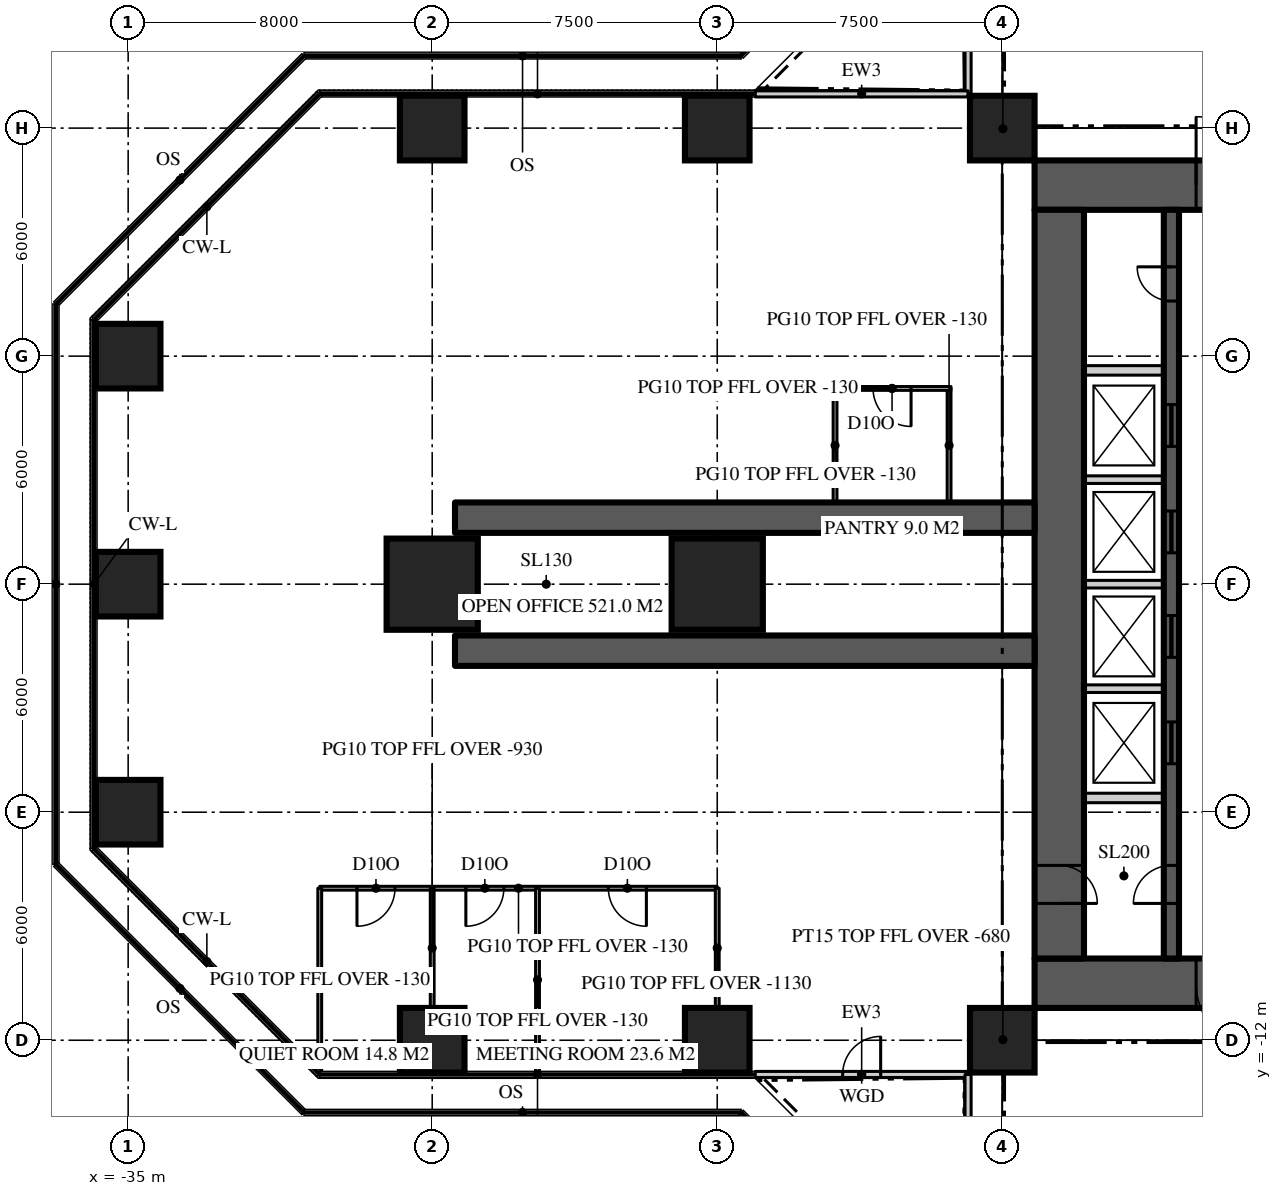
"""IFC4 building model, lengths in metres.
Left out: names, types, materials, properties, quantities, classifications, styles, units other than length and angle.
Written with IfcOpenShell. Run it as: python <this file> out.ifc"""

import sys

from ifc_helpers import new_model, si_unit, direction, frame, frame_2d, origin, origin_2d, place, context, subcontext, project, spatial, rectangle, extrude, element, fill, save


model = new_model("IFC4")
c1 = context("Model", 3, precision=1e-05, world=origin(), true_north=direction((0.0, 1.0)))
c2 = subcontext(c1, "Body", "Model", "MODEL_VIEW")
j1 = project(units=[si_unit("LENGTHUNIT", "METRE"), si_unit("PLANEANGLEUNIT", "RADIAN")], contexts=[c1])
p1 = place(None, origin())
s1 = spatial("IfcSite", under=j1, at=p1, CompositionType="ELEMENT")
p2 = place(p1, origin())
s2 = spatial("IfcBuilding", under=s1, at=p2, CompositionType="ELEMENT")
p3 = place(p2, frame((0.0, 0.0, 66.9)))
s3 = spatial("IfcBuildingStorey", under=s2, at=p3, CompositionType="ELEMENT", Elevation=66.9)
p4 = place(p3, frame((-11.15, 10.5, 0.0), z_axis=(0.0, 0.0, 1.0), x_axis=(1.0, 0.0, 0.0)))
e1 = element("IfcWall", 1, at=p4, inside=s3, PredefinedType="SHEAR", context=c2, shape_type="SweptSolid", body=[
    extrude(rectangle(XDim=22.3, YDim=1.3, at=frame_2d((11.15, 0.0))), origin(), (0.0, 0.0, 1.0), 3.9),
])
p5 = place(p4, frame((4.25, 0.0, 0.0)))
e2 = element("IfcOpeningElement", 2, at=p5, cuts=e1, PredefinedType="OPENING", context=c2, shape_type="SweptSolid", body=[
    extrude(rectangle(XDim=1.8, YDim=2.2, at=frame_2d((0.9, 1.1))), frame((0.0, 0.66, 0.0), z_axis=(0.0, -1.0, 0.0), x_axis=(1.0, 0.0, 0.0)), (0.0, 0.0, 1.0), 1.32),
])
p6 = place(p4, frame((16.25, 0.0, 0.0)))
e3 = element("IfcOpeningElement", 3, at=p6, cuts=e1, PredefinedType="OPENING", context=c2, shape_type="SweptSolid", body=[
    extrude(rectangle(XDim=1.8, YDim=2.2, at=frame_2d((0.9, 1.1))), frame((0.0, 0.66, 0.0), z_axis=(0.0, -1.0, 0.0), x_axis=(1.0, 0.0, 0.0)), (0.0, 0.0, 1.0), 1.32),
])
p7 = place(p3, frame((11.15, -10.5, 0.0), z_axis=(0.0, 0.0, 1.0), x_axis=(-1.0, 0.0, 0.0)))
e4 = element("IfcWall", 4, at=p7, inside=s3, PredefinedType="SHEAR", context=c2, shape_type="SweptSolid", body=[
    extrude(rectangle(XDim=22.3, YDim=1.3, at=frame_2d((11.15, 0.0))), origin(), (0.0, 0.0, 1.0), 3.9),
])
p8 = place(p7, frame((16.25, 0.0, 0.0)))
e5 = element("IfcOpeningElement", 5, at=p8, cuts=e4, PredefinedType="OPENING", context=c2, shape_type="SweptSolid", body=[
    extrude(rectangle(XDim=1.8, YDim=2.2, at=frame_2d((0.9, 1.1))), frame((0.0, 0.66, 0.0), z_axis=(0.0, -1.0, 0.0), x_axis=(1.0, 0.0, 0.0)), (0.0, 0.0, 1.0), 1.32),
])
p9 = place(p7, frame((4.25, 0.0, 0.0)))
e6 = element("IfcOpeningElement", 6, at=p9, cuts=e4, PredefinedType="OPENING", context=c2, shape_type="SweptSolid", body=[
    extrude(rectangle(XDim=1.8, YDim=2.2, at=frame_2d((0.9, 1.1))), frame((0.0, 0.66, 0.0), z_axis=(0.0, -1.0, 0.0), x_axis=(1.0, 0.0, 0.0)), (0.0, 0.0, 1.0), 1.32),
])
p10 = place(p3, frame((-10.5, 9.85, 0.0), z_axis=(0.0, 0.0, 1.0), x_axis=(0.0, -1.0, 0.0)))
e7 = element("IfcWall", 7, at=p10, inside=s3, PredefinedType="SHEAR", context=c2, shape_type="SweptSolid", body=[
    extrude(rectangle(XDim=19.7, YDim=1.3, at=frame_2d((9.85, 0.0))), origin(), (0.0, 0.0, 1.0), 3.9),
])
p11 = place(p10, frame((17.25, 0.0, 0.0)))
e8 = element("IfcOpeningElement", 8, at=p11, cuts=e7, PredefinedType="OPENING", context=c2, shape_type="SweptSolid", body=[
    extrude(rectangle(XDim=1.0, YDim=2.2, at=frame_2d((0.5, 1.1))), frame((0.0, 0.66, 0.0), z_axis=(0.0, -1.0, 0.0), x_axis=(1.0, 0.0, 0.0)), (0.0, 0.0, 1.0), 1.32),
])
for number, where, z_axis, x_axis in (
    (9, (-11.15, 1.75, 0.0), (0.0, 0.0, 1.0), (-1.0, 0.0, 0.0)),
    (10, (-11.15, -1.75, 0.0), (0.0, 0.0, 1.0), (-1.0, 0.0, 0.0)),
):
    element("IfcWall", number, at=place(p3, frame(where, z_axis=z_axis, x_axis=x_axis)), inside=s3, PredefinedType="SHEAR", context=c2, shape_type="SweptSolid", body=[
        extrude(rectangle(XDim=15.25, YDim=0.8, at=frame_2d((7.625, 0.0))), origin(), (0.0, 0.0, 1.0), 3.9),
    ])
for number, where, z_axis, x_axis in (
    (11, (-27.0, -12.0, 0.0), (0.0, 0.0, 1.0), (1.0, 0.0, 0.0)),
    (12, (-19.5, -12.0, 0.0), (0.0, 0.0, 1.0), (1.0, 0.0, 0.0)),
    (13, (-12.0, -12.0, 0.0), (0.0, 0.0, 1.0), (1.0, 0.0, 0.0)),
    (14, (-35.0, -6.0, 0.0), (0.0, 0.0, 1.0), (1.0, 0.0, 0.0)),
    (15, (-35.0, 0.0, 0.0), (0.0, 0.0, 1.0), (1.0, 0.0, 0.0)),
):
    element("IfcColumn", number, at=place(p3, frame(where, z_axis=z_axis, x_axis=x_axis)), inside=s3, PredefinedType="COLUMN", context=c2, shape_type="SweptSolid", body=[
        extrude(rectangle(XDim=1.7, YDim=1.7, at=origin_2d()), origin(), (0.0, 0.0, 1.0), 3.9),
    ])
for number, where, z_axis, x_axis in (
    (16, (-27.0, 0.0, 0.0), (0.0, 0.0, 1.0), (1.0, 0.0, 0.0)),
    (17, (-19.5, 0.0, 0.0), (0.0, 0.0, 1.0), (1.0, 0.0, 0.0)),
):
    element("IfcColumn", number, at=place(p3, frame(where, z_axis=z_axis, x_axis=x_axis)), inside=s3, PredefinedType="COLUMN", context=c2, shape_type="SweptSolid", body=[
        extrude(rectangle(XDim=2.4, YDim=2.4, at=origin_2d()), origin(), (0.0, 0.0, 1.0), 3.9),
    ])
for number, where, z_axis, x_axis in (
    (18, (-35.0, 6.0, 0.0), (0.0, 0.0, 1.0), (1.0, 0.0, 0.0)),
    (19, (-27.0, 12.0, 0.0), (0.0, 0.0, 1.0), (1.0, 0.0, 0.0)),
    (20, (-19.5, 12.0, 0.0), (0.0, 0.0, 1.0), (1.0, 0.0, 0.0)),
    (21, (-12.0, 12.0, 0.0), (0.0, 0.0, 1.0), (1.0, 0.0, 0.0)),
):
    element("IfcColumn", number, at=place(p3, frame(where, z_axis=z_axis, x_axis=x_axis)), inside=s3, PredefinedType="COLUMN", context=c2, shape_type="SweptSolid", body=[
        extrude(rectangle(XDim=1.7, YDim=1.7, at=origin_2d()), origin(), (0.0, 0.0, 1.0), 3.9),
    ])
p12 = place(p3, frame((-12.9, 18.5, 0.0), z_axis=(0.0, 0.0, 1.0), x_axis=(0.0, -1.0, 0.0)))
e22 = element("IfcWall", 22, at=p12, inside=s3, PredefinedType="SOLIDWALL", context=c2, shape_type="SweptSolid", body=[
    extrude(rectangle(XDim=5.6, YDim=0.16, at=frame_2d((2.8, 0.0))), origin(), (0.0, 0.0, 1.0), 3.77),
])
p13 = place(p12, frame((2.3, 0.0, 0.0)))
e23 = element("IfcOpeningElement", 23, at=p13, cuts=e22, PredefinedType="OPENING", context=c2, shape_type="SweptSolid", body=[
    extrude(rectangle(XDim=1.0, YDim=2.2, at=frame_2d((0.5, 1.1))), frame((0.0, 0.09, 0.0), z_axis=(0.0, -1.0, 0.0), x_axis=(1.0, 0.0, 0.0)), (0.0, 0.0, 1.0), 0.18),
])
p14 = place(p3, frame((-12.9, 12.9, 0.0), z_axis=(0.0, 0.0, 1.0), x_axis=(-1.0, 0.0, 0.0)))
e24 = element("IfcWall", 24, at=p14, inside=s3, PredefinedType="SOLIDWALL", context=c2, shape_type="SweptSolid", body=[
    extrude(rectangle(XDim=5.6, YDim=0.16, at=frame_2d((2.8, 0.0))), origin(), (0.0, 0.0, 1.0), 3.77),
])
p15 = place(p3, frame((-18.5, -12.9, 0.0), z_axis=(0.0, 0.0, 1.0), x_axis=(1.0, 0.0, 0.0)))
e25 = element("IfcWall", 25, at=p15, inside=s3, PredefinedType="SOLIDWALL", context=c2, shape_type="SweptSolid", body=[
    extrude(rectangle(XDim=5.6, YDim=0.16, at=frame_2d((2.8, 0.0))), origin(), (0.0, 0.0, 1.0), 3.77),
])
p16 = place(p15, frame((2.3, 0.0, 0.0)))
e26 = element("IfcOpeningElement", 26, at=p16, cuts=e25, PredefinedType="OPENING", context=c2, shape_type="SweptSolid", body=[
    extrude(rectangle(XDim=1.0, YDim=2.2, at=frame_2d((0.5, 1.1))), frame((0.0, 0.09, 0.0), z_axis=(0.0, -1.0, 0.0), x_axis=(1.0, 0.0, 0.0)), (0.0, 0.0, 1.0), 0.18),
])
p17 = place(p3, frame((-12.9, -12.9, 0.0), z_axis=(0.0, 0.0, 1.0), x_axis=(0.0, -1.0, 0.0)))
e27 = element("IfcWall", 27, at=p17, inside=s3, PredefinedType="SOLIDWALL", context=c2, shape_type="SweptSolid", body=[
    extrude(rectangle(XDim=5.6, YDim=0.16, at=frame_2d((2.8, 0.0))), origin(), (0.0, 0.0, 1.0), 3.77),
])
p18 = place(p3, frame((-7.55, -9.85, 0.0), z_axis=(0.0, 0.0, 1.0), x_axis=(0.0, 1.0, 0.0)))
e28 = element("IfcWall", 28, at=p18, inside=s3, PredefinedType="SHEAR", context=c2, shape_type="SweptSolid", body=[
    extrude(rectangle(XDim=19.7, YDim=0.4, at=frame_2d((9.85, 0.0))), origin(), (0.0, 0.0, 1.0), 3.9),
])
p19 = place(p18, frame((1.45, 0.0, 0.0)))
e29 = element("IfcOpeningElement", 29, at=p19, cuts=e28, PredefinedType="OPENING", context=c2, shape_type="SweptSolid", body=[
    extrude(rectangle(XDim=1.0, YDim=2.2, at=frame_2d((0.5, 1.1))), frame((0.0, 0.21, 0.0), z_axis=(0.0, -1.0, 0.0), x_axis=(1.0, 0.0, 0.0)), (0.0, 0.0, 1.0), 0.42),
])
p20 = place(p18, frame((17.3, 0.0, 0.0)))
e30 = element("IfcOpeningElement", 30, at=p20, cuts=e28, PredefinedType="OPENING", context=c2, shape_type="SweptSolid", body=[
    extrude(rectangle(XDim=0.9, YDim=2.1, at=frame_2d((0.45, 1.05))), frame((0.0, 0.21, 0.0), z_axis=(0.0, -1.0, 0.0), x_axis=(1.0, 0.0, 0.0)), (0.0, 0.0, 1.0), 0.42),
])
p21 = place(p18, frame((5.125, 0.0, 0.0)))
e31 = element("IfcOpeningElement", 31, at=p21, cuts=e28, PredefinedType="OPENING", context=c2, shape_type="SweptSolid", body=[
    extrude(rectangle(XDim=1.1, YDim=2.2, at=frame_2d((0.55, 1.1))), frame((0.0, 0.21, 0.0), z_axis=(0.0, -1.0, 0.0), x_axis=(1.0, 0.0, 0.0)), (0.0, 0.0, 1.0), 0.42),
])
p22 = place(p18, frame((7.925, 0.0, 0.0)))
e32 = element("IfcOpeningElement", 32, at=p22, cuts=e28, PredefinedType="OPENING", context=c2, shape_type="SweptSolid", body=[
    extrude(rectangle(XDim=1.1, YDim=2.2, at=frame_2d((0.55, 1.1))), frame((0.0, 0.21, 0.0), z_axis=(0.0, -1.0, 0.0), x_axis=(1.0, 0.0, 0.0)), (0.0, 0.0, 1.0), 0.42),
])
p23 = place(p18, frame((10.675, 0.0, 0.0)))
e33 = element("IfcOpeningElement", 33, at=p23, cuts=e28, PredefinedType="OPENING", context=c2, shape_type="SweptSolid", body=[
    extrude(rectangle(XDim=1.1, YDim=2.2, at=frame_2d((0.55, 1.1))), frame((0.0, 0.21, 0.0), z_axis=(0.0, -1.0, 0.0), x_axis=(1.0, 0.0, 0.0)), (0.0, 0.0, 1.0), 0.42),
])
p24 = place(p18, frame((13.475, 0.0, 0.0)))
e34 = element("IfcOpeningElement", 34, at=p24, cuts=e28, PredefinedType="OPENING", context=c2, shape_type="SweptSolid", body=[
    extrude(rectangle(XDim=1.1, YDim=2.2, at=frame_2d((0.55, 1.1))), frame((0.0, 0.21, 0.0), z_axis=(0.0, -1.0, 0.0), x_axis=(1.0, 0.0, 0.0)), (0.0, 0.0, 1.0), 0.42),
])
for number, where, z_axis, x_axis in (
    (35, (-9.85, 5.625, 0.0), (0.0, 0.0, 1.0), (1.0, 0.0, 0.0)),
    (36, (-9.85, -5.625, 0.0), (0.0, 0.0, 1.0), (1.0, 0.0, 0.0)),
):
    element("IfcWall", number, at=place(p3, frame(where, z_axis=z_axis, x_axis=x_axis)), inside=s3, PredefinedType="SOLIDWALL", context=c2, shape_type="SweptSolid", body=[
        extrude(rectangle(XDim=2.1, YDim=0.25, at=frame_2d((1.05, 0.0))), origin(), (0.0, 0.0, 1.0), 3.7),
    ])
for number, where, z_axis, x_axis in (
    (37, (-9.85, -2.75, 0.0), (0.0, 0.0, 1.0), (1.0, 0.0, 0.0)),
    (38, (-9.85, 0.0, 0.0), (0.0, 0.0, 1.0), (1.0, 0.0, 0.0)),
    (39, (-9.85, 2.75, 0.0), (0.0, 0.0, 1.0), (1.0, 0.0, 0.0)),
):
    element("IfcWall", number, at=place(p3, frame(where, z_axis=z_axis, x_axis=x_axis)), inside=s3, PredefinedType="SOLIDWALL", context=c2, shape_type="SweptSolid", body=[
        extrude(rectangle(XDim=2.1, YDim=0.2, at=frame_2d((1.05, 0.0))), origin(), (0.0, 0.0, 1.0), 3.7),
    ])
p25 = place(p3, frame((-19.5, -8.0, 0.0), z_axis=(0.0, 0.0, 1.0), x_axis=(-1.0, 0.0, 0.0)))
e40 = element("IfcWall", 40, at=p25, inside=s3, PredefinedType="PARTITIONING", context=c2, shape_type="SweptSolid", body=[
    extrude(rectangle(XDim=10.459, YDim=0.1, at=frame_2d((5.229, 0.0))), origin(), (0.0, 0.0, 1.0), 3.77),
])
p26 = place(p25, frame((1.865, 0.0, 0.0)))
e41 = element("IfcOpeningElement", 41, at=p26, cuts=e40, PredefinedType="OPENING", context=c2, shape_type="SweptSolid", body=[
    extrude(rectangle(XDim=1.0, YDim=2.2, at=frame_2d((0.5, 1.1))), frame((0.0, 0.06, 0.0), z_axis=(0.0, -1.0, 0.0), x_axis=(1.0, 0.0, 0.0)), (0.0, 0.0, 1.0), 0.12),
])
p27 = place(p25, frame((5.615, 0.0, 0.0)))
e42 = element("IfcOpeningElement", 42, at=p27, cuts=e40, PredefinedType="OPENING", context=c2, shape_type="SweptSolid", body=[
    extrude(rectangle(XDim=1.0, YDim=2.2, at=frame_2d((0.5, 1.1))), frame((0.0, 0.06, 0.0), z_axis=(0.0, -1.0, 0.0), x_axis=(1.0, 0.0, 0.0)), (0.0, 0.0, 1.0), 0.12),
])
p28 = place(p25, frame((8.479, 0.0, 0.0)))
e43 = element("IfcOpeningElement", 43, at=p28, cuts=e40, PredefinedType="OPENING", context=c2, shape_type="SweptSolid", body=[
    extrude(rectangle(XDim=1.0, YDim=2.2, at=frame_2d((0.5, 1.1))), frame((0.0, 0.06, 0.0), z_axis=(0.0, -1.0, 0.0), x_axis=(1.0, 0.0, 0.0)), (0.0, 0.0, 1.0), 0.12),
])
p29 = place(p3, frame((-19.5, -8.0, 0.0), z_axis=(0.0, 0.0, 1.0), x_axis=(0.0, -1.0, 0.0)))
e44 = element("IfcWall", 44, at=p29, inside=s3, PredefinedType="PARTITIONING", context=c2, shape_type="SweptSolid", body=[
    extrude(rectangle(XDim=3.15, YDim=0.1, at=frame_2d((1.575, 0.0))), origin(), (0.0, 0.0, 1.0), 2.77),
])
p30 = place(p3, frame((-24.229, -8.0, 0.0), z_axis=(0.0, 0.0, 1.0), x_axis=(0.0, -1.0, 0.0)))
e45 = element("IfcWall", 45, at=p30, inside=s3, PredefinedType="PARTITIONING", context=c2, shape_type="SweptSolid", body=[
    extrude(rectangle(XDim=4.82, YDim=0.1, at=frame_2d((2.41, 0.0))), origin(), (0.0, 0.0, 1.0), 3.77),
])
p31 = place(p3, frame((-27.0, -8.0, 0.0), z_axis=(0.0, 0.0, 1.0), x_axis=(0.0, -1.0, 0.0)))
e46 = element("IfcWall", 46, at=p31, inside=s3, PredefinedType="PARTITIONING", context=c2, shape_type="SweptSolid", body=[
    extrude(rectangle(XDim=3.15, YDim=0.1, at=frame_2d((1.575, 0.0))), origin(), (0.0, 0.0, 1.0), 2.97),
])
p32 = place(p3, frame((-29.959, -8.0, 0.0), z_axis=(0.0, 0.0, 1.0), x_axis=(0.0, -1.0, 0.0)))
e47 = element("IfcWall", 47, at=p32, inside=s3, PredefinedType="PARTITIONING", context=c2, shape_type="SweptSolid", body=[
    extrude(rectangle(XDim=4.82, YDim=0.1, at=frame_2d((2.41, 0.0))), origin(), (0.0, 0.0, 1.0), 3.77),
])
for number, where, z_axis, x_axis in (
    (48, (-13.4, 2.15, 0.0), (0.0, 0.0, 1.0), (0.0, 1.0, 0.0)),
    (49, (-16.4, 2.15, 0.0), (0.0, 0.0, 1.0), (0.0, 1.0, 0.0)),
):
    element("IfcWall", number, at=place(p3, frame(where, z_axis=z_axis, x_axis=x_axis)), inside=s3, PredefinedType="PARTITIONING", context=c2, shape_type="SweptSolid", body=[
        extrude(rectangle(XDim=3.0, YDim=0.1, at=frame_2d((1.5, 0.0))), origin(), (0.0, 0.0, 1.0), 3.77),
    ])
p33 = place(p3, frame((-13.35, 5.15, 0.0), z_axis=(0.0, 0.0, 1.0), x_axis=(-1.0, 0.0, 0.0)))
e50 = element("IfcWall", 50, at=p33, inside=s3, PredefinedType="PARTITIONING", context=c2, shape_type="SweptSolid", body=[
    extrude(rectangle(XDim=3.1, YDim=0.1, at=frame_2d((1.55, 0.0))), origin(), (0.0, 0.0, 1.0), 3.77),
])
p34 = place(p33, frame((1.05, 0.0, 0.0)))
e51 = element("IfcOpeningElement", 51, at=p34, cuts=e50, PredefinedType="OPENING", context=c2, shape_type="SweptSolid", body=[
    extrude(rectangle(XDim=1.0, YDim=2.2, at=frame_2d((0.5, 1.1))), frame((0.0, 0.06, 0.0), z_axis=(0.0, -1.0, 0.0), x_axis=(1.0, 0.0, 0.0)), (0.0, 0.0, 1.0), 0.12),
])
for number, where, z_axis, x_axis in (
    (52, (-11.15, 11.15, 0.0), (0.0, 0.0, 1.0), (-0.707, 0.707, 0.0)),
    (53, (-11.15, -11.15, 0.0), (0.0, 0.0, 1.0), (-0.707, -0.707, 0.0)),
):
    element("IfcWall", number, at=place(p3, frame(where, z_axis=z_axis, x_axis=x_axis)), inside=s3, PredefinedType="PARTITIONING", context=c2, shape_type="SweptSolid", body=[
        extrude(rectangle(XDim=2.362, YDim=0.15, at=frame_2d((1.181, 0.0))), origin(), (0.0, 0.0, 1.0), 3.22),
    ])
p35 = place(p16, origin())
e54 = element("IfcDoor", 54, at=p35, inside=s3, OperationType="SINGLE_SWING_RIGHT", PredefinedType="DOOR", context=c2, shape_type="SweptSolid", body=[
    extrude(rectangle(XDim=1.0, YDim=2.2, at=frame_2d((0.5, 1.1))), frame((0.0, 0.025, 0.0), z_axis=(0.0, -1.0, 0.0), x_axis=(1.0, 0.0, 0.0)), (0.0, 0.0, 1.0), 0.05),
])
fill(e26, e54)
p36 = place(p5, origin())
e55 = element("IfcDoor", 55, at=p36, inside=s3, OperationType="DOUBLE_DOOR_DOUBLE_SWING", PredefinedType="DOOR", context=c2, shape_type="SweptSolid", body=[
    extrude(rectangle(XDim=1.8, YDim=2.2, at=frame_2d((0.9, 1.1))), frame((0.0, 0.025, 0.0), z_axis=(0.0, -1.0, 0.0), x_axis=(1.0, 0.0, 0.0)), (0.0, 0.0, 1.0), 0.05),
])
fill(e2, e55)
p37 = place(p8, origin())
e56 = element("IfcDoor", 56, at=p37, inside=s3, OperationType="DOUBLE_DOOR_DOUBLE_SWING", PredefinedType="DOOR", context=c2, shape_type="SweptSolid", body=[
    extrude(rectangle(XDim=1.8, YDim=2.2, at=frame_2d((0.9, 1.1))), frame((0.0, 0.025, 0.0), z_axis=(0.0, -1.0, 0.0), x_axis=(1.0, 0.0, 0.0)), (0.0, 0.0, 1.0), 0.05),
])
fill(e5, e56)
p38 = place(p19, origin())
e57 = element("IfcDoor", 57, at=p38, inside=s3, OperationType="SINGLE_SWING_LEFT", PredefinedType="DOOR", context=c2, shape_type="SweptSolid", body=[
    extrude(rectangle(XDim=1.0, YDim=2.2, at=frame_2d((0.5, 1.1))), frame((0.0, 0.025, 0.0), z_axis=(0.0, -1.0, 0.0), x_axis=(1.0, 0.0, 0.0)), (0.0, 0.0, 1.0), 0.05),
])
fill(e29, e57)
p39 = place(p11, origin())
e58 = element("IfcDoor", 58, at=p39, inside=s3, OperationType="SINGLE_SWING_RIGHT", PredefinedType="DOOR", context=c2, shape_type="SweptSolid", body=[
    extrude(rectangle(XDim=1.0, YDim=2.2, at=frame_2d((0.5, 1.1))), frame((0.0, 0.025, 0.0), z_axis=(0.0, -1.0, 0.0), x_axis=(1.0, 0.0, 0.0)), (0.0, 0.0, 1.0), 0.05),
])
fill(e8, e58)
p40 = place(p20, origin())
e59 = element("IfcDoor", 59, at=p40, inside=s3, OperationType="SINGLE_SWING_RIGHT", PredefinedType="DOOR", context=c2, shape_type="SweptSolid", body=[
    extrude(rectangle(XDim=0.9, YDim=2.1, at=frame_2d((0.45, 1.05))), frame((0.0, 0.025, 0.0), z_axis=(0.0, -1.0, 0.0), x_axis=(1.0, 0.0, 0.0)), (0.0, 0.0, 1.0), 0.05),
])
fill(e30, e59)
p41 = place(p21, origin())
e60 = element("IfcDoor", 60, at=p41, inside=s3, OperationType="SLIDING_TO_LEFT", PredefinedType="DOOR", context=c2, shape_type="SweptSolid", body=[
    extrude(rectangle(XDim=1.1, YDim=2.2, at=frame_2d((0.55, 1.1))), frame((0.0, 0.025, 0.0), z_axis=(0.0, -1.0, 0.0), x_axis=(1.0, 0.0, 0.0)), (0.0, 0.0, 1.0), 0.05),
])
fill(e31, e60)
p42 = place(p22, origin())
e61 = element("IfcDoor", 61, at=p42, inside=s3, OperationType="SLIDING_TO_LEFT", PredefinedType="DOOR", context=c2, shape_type="SweptSolid", body=[
    extrude(rectangle(XDim=1.1, YDim=2.2, at=frame_2d((0.55, 1.1))), frame((0.0, 0.025, 0.0), z_axis=(0.0, -1.0, 0.0), x_axis=(1.0, 0.0, 0.0)), (0.0, 0.0, 1.0), 0.05),
])
fill(e32, e61)
p43 = place(p23, origin())
e62 = element("IfcDoor", 62, at=p43, inside=s3, OperationType="SLIDING_TO_LEFT", PredefinedType="DOOR", context=c2, shape_type="SweptSolid", body=[
    extrude(rectangle(XDim=1.1, YDim=2.2, at=frame_2d((0.55, 1.1))), frame((0.0, 0.025, 0.0), z_axis=(0.0, -1.0, 0.0), x_axis=(1.0, 0.0, 0.0)), (0.0, 0.0, 1.0), 0.05),
])
fill(e33, e62)
p44 = place(p24, origin())
e63 = element("IfcDoor", 63, at=p44, inside=s3, OperationType="SLIDING_TO_LEFT", PredefinedType="DOOR", context=c2, shape_type="SweptSolid", body=[
    extrude(rectangle(XDim=1.1, YDim=2.2, at=frame_2d((0.55, 1.1))), frame((0.0, 0.025, 0.0), z_axis=(0.0, -1.0, 0.0), x_axis=(1.0, 0.0, 0.0)), (0.0, 0.0, 1.0), 0.05),
])
fill(e34, e63)
p45 = place(p26, origin())
e64 = element("IfcDoor", 64, at=p45, inside=s3, OperationType="SINGLE_SWING_LEFT", PredefinedType="DOOR", context=c2, shape_type="SweptSolid", body=[
    extrude(rectangle(XDim=1.0, YDim=2.2, at=frame_2d((0.5, 1.1))), frame((0.0, 0.025, 0.0), z_axis=(0.0, -1.0, 0.0), x_axis=(1.0, 0.0, 0.0)), (0.0, 0.0, 1.0), 0.05),
])
fill(e41, e64)
p46 = place(p27, origin())
e65 = element("IfcDoor", 65, at=p46, inside=s3, OperationType="SINGLE_SWING_RIGHT", PredefinedType="DOOR", context=c2, shape_type="SweptSolid", body=[
    extrude(rectangle(XDim=1.0, YDim=2.2, at=frame_2d((0.5, 1.1))), frame((0.0, 0.025, 0.0), z_axis=(0.0, -1.0, 0.0), x_axis=(1.0, 0.0, 0.0)), (0.0, 0.0, 1.0), 0.05),
])
fill(e42, e65)
p47 = place(p28, origin())
e66 = element("IfcDoor", 66, at=p47, inside=s3, OperationType="SINGLE_SWING_RIGHT", PredefinedType="DOOR", context=c2, shape_type="SweptSolid", body=[
    extrude(rectangle(XDim=1.0, YDim=2.2, at=frame_2d((0.5, 1.1))), frame((0.0, 0.025, 0.0), z_axis=(0.0, -1.0, 0.0), x_axis=(1.0, 0.0, 0.0)), (0.0, 0.0, 1.0), 0.05),
])
fill(e43, e66)
p48 = place(p34, origin())
e67 = element("IfcDoor", 67, at=p48, inside=s3, OperationType="SINGLE_SWING_LEFT", PredefinedType="DOOR", context=c2, shape_type="SweptSolid", body=[
    extrude(rectangle(XDim=1.0, YDim=2.2, at=frame_2d((0.5, 1.1))), frame((0.0, 0.025, 0.0), z_axis=(0.0, -1.0, 0.0), x_axis=(1.0, 0.0, 0.0)), (0.0, 0.0, 1.0), 0.05),
])
fill(e51, e67)
save(model, sys.argv[1])
